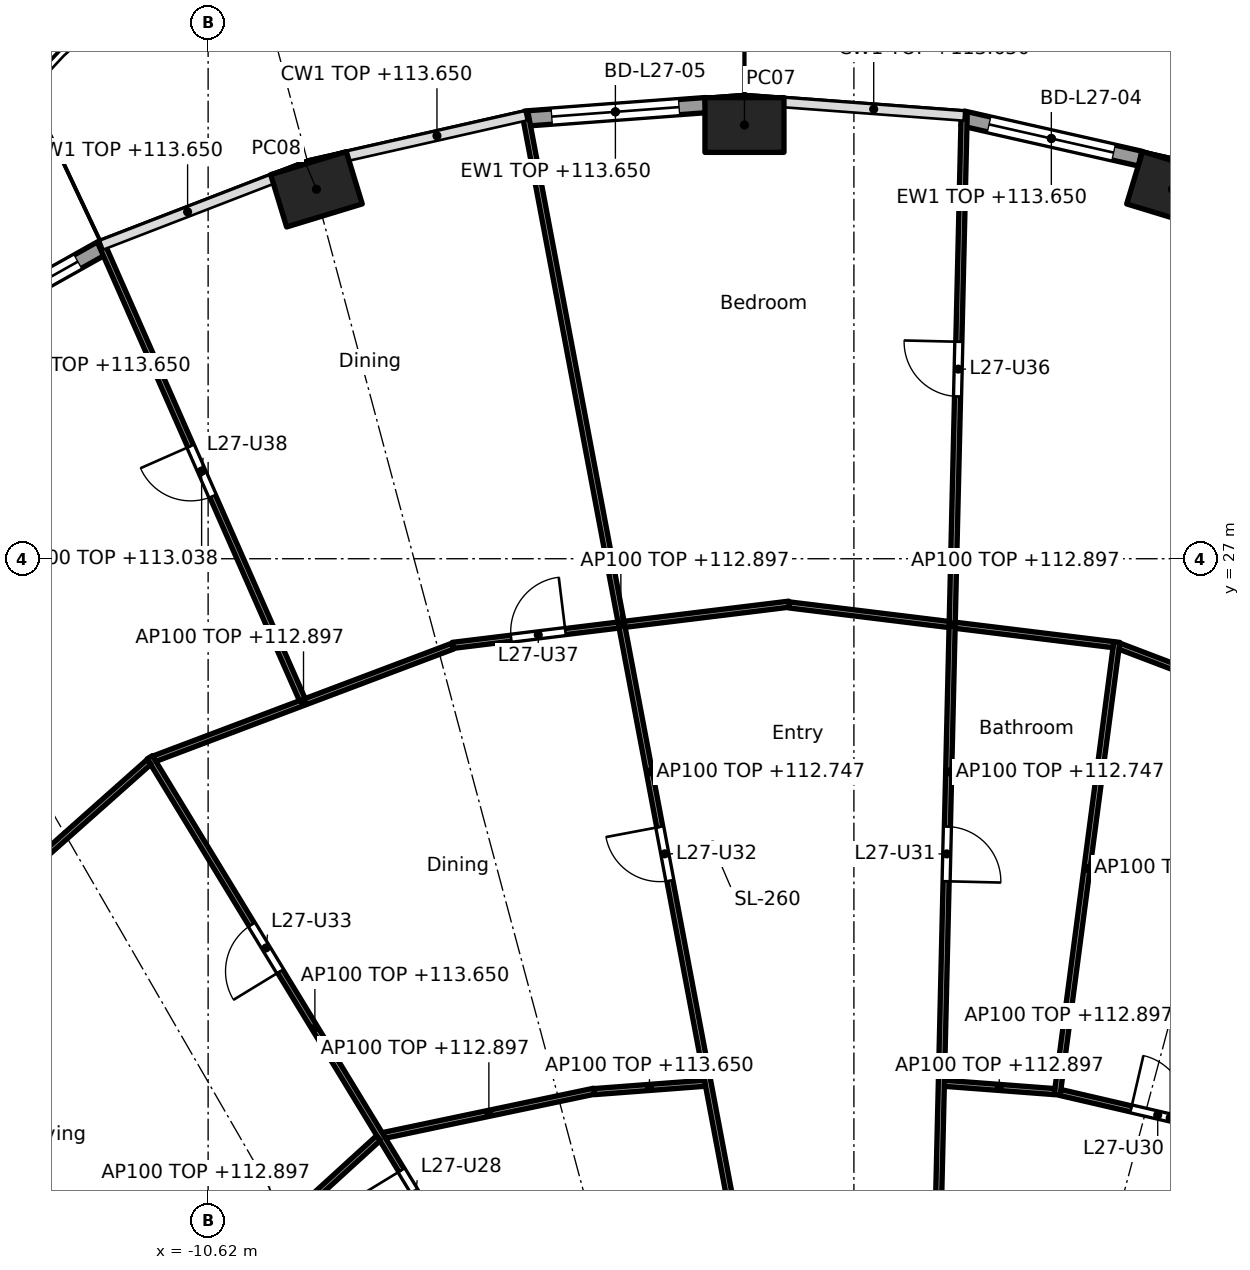
"""IFC4 building model, lengths in metres.
Left out: names, types, materials, properties, quantities, classifications, styles, units other than length and angle.
Written with IfcOpenShell. Run it as: python <this file> out.ifc"""

import sys

from ifc_helpers import new_model, si_unit, direction, frame, frame_2d, origin, origin_2d, place, context, subcontext, project, spatial, rectangle, hollow_rectangle, extrude, element, fill, save


model = new_model("IFC4")
c1 = context("Model", 3, precision=1e-05, world=origin(), true_north=direction((0.0, 1.0)))
c2 = subcontext(c1, "Body", "Model", "MODEL_VIEW")
j1 = project(units=[si_unit("LENGTHUNIT", "METRE"), si_unit("PLANEANGLEUNIT", "RADIAN")], contexts=[c1])
p1 = place(None, origin())
s1 = spatial("IfcSite", under=j1, at=p1, CompositionType="ELEMENT")
p2 = place(p1, origin())
s2 = spatial("IfcBuilding", under=s1, at=p2, CompositionType="ELEMENT")
p3 = place(p2, frame((0.0, 0.0, 110.3)))
s3 = spatial("IfcBuildingStorey", under=s2, at=p3, CompositionType="ELEMENT", Elevation=110.3)
for number, where, z_axis, x_axis in (
    (1, (5.239, 33.076, 0.0), (0.0, 0.0, 1.0), (-0.957, 0.292, 0.0)),
    (2, (-1.8, 34.133, 0.0), (0.0, 0.0, 1.0), (-1.0, 0.0, 0.0)),
    (3, (-8.839, 33.076, 0.0), (0.0, 0.0, 1.0), (-0.957, -0.292, 0.0)),
):
    element("IfcColumn", number, at=place(p3, frame(where, z_axis=z_axis, x_axis=x_axis)), inside=s3, PredefinedType="COLUMN", context=c2, shape_type="SweptSolid", body=[
        extrude(hollow_rectangle(XDim=1.3, YDim=0.9, WallThickness=0.045, at=origin_2d()), origin(), (0.0, 0.0, 1.0), 3.7),
    ])
p4 = place(p3, frame((1.787, 34.241, 0.0), z_axis=(0.0, 0.0, 1.0), x_axis=(0.975317607872, -0.220806620767, 0.0)))
e4 = element("IfcWall", 4, at=p4, inside=s3, PredefinedType="SOLIDWALL", context=c2, shape_type="SweptSolid", body=[
    extrude(rectangle(XDim=2.993, YDim=0.25, at=frame_2d((1.497, 0.0))), origin(), (0.0, 0.0, 1.0), 3.35),
])
p5 = place(p4, frame((0.447, 0.0, 0.0)))
e5 = element("IfcOpeningElement", 5, at=p5, cuts=e4, PredefinedType="OPENING", context=c2, shape_type="SweptSolid", body=[
    extrude(rectangle(XDim=2.1, YDim=2.4, at=frame_2d((1.05, 1.2))), frame((0.0, 0.135, 0.0), z_axis=(0.0, -1.0, 0.0), x_axis=(1.0, 0.0, 0.0)), (0.0, 0.0, 1.0), 0.27),
])
p6 = place(p3, frame((-5.406, 34.239, 0.0), z_axis=(0.0, 0.0, 1.0), x_axis=(0.997231808538, 0.074355363224, 0.0)))
e6 = element("IfcWall", 6, at=p6, inside=s3, PredefinedType="SOLIDWALL", context=c2, shape_type="SweptSolid", body=[
    extrude(rectangle(XDim=2.975, YDim=0.25, at=frame_2d((1.487, 0.0))), origin(), (0.0, 0.0, 1.0), 3.35),
])
p7 = place(p6, frame((0.438, 0.0, 0.0)))
e7 = element("IfcOpeningElement", 7, at=p7, cuts=e6, PredefinedType="OPENING", context=c2, shape_type="SweptSolid", body=[
    extrude(rectangle(XDim=2.1, YDim=2.4, at=frame_2d((1.05, 1.2))), frame((0.0, 0.135, 0.0), z_axis=(0.0, -1.0, 0.0), x_axis=(1.0, 0.0, 0.0)), (0.0, 0.0, 1.0), 0.27),
])
p8 = place(p3, frame((-15.02, 30.62, 0.0), z_axis=(0.0, 0.0, 1.0), x_axis=(0.872090167423, 0.489345215451, 0.0)))
e8 = element("IfcWall", 8, at=p8, inside=s3, PredefinedType="SOLIDWALL", context=c2, shape_type="SweptSolid", body=[
    extrude(rectangle(XDim=3.076, YDim=0.25, at=frame_2d((1.538, 0.0))), origin(), (0.0, 0.0, 1.0), 3.35),
])
p9 = place(p8, frame((0.488, 0.0, 0.0)))
e9 = element("IfcOpeningElement", 9, at=p9, cuts=e8, PredefinedType="OPENING", context=c2, shape_type="SweptSolid", body=[
    extrude(rectangle(XDim=2.1, YDim=2.4, at=frame_2d((1.05, 1.2))), frame((0.0, 0.135, 0.0), z_axis=(0.0, -1.0, 0.0), x_axis=(1.0, 0.0, 0.0)), (0.0, 0.0, 1.0), 0.27),
])
p10 = place(p3, frame((7.004, 17.386, 0.0), z_axis=(0.0, 0.0, 1.0), x_axis=(-0.974172890163, 0.22580341023, 0.0)))
e10 = element("IfcWall", 10, at=p10, inside=s3, PredefinedType="PARTITIONING", context=c2, shape_type="SweptSolid", body=[
    extrude(rectangle(XDim=3.702, YDim=0.1, at=frame_2d((1.851, 0.0))), origin(), (0.0, 0.0, 1.0), 2.597),
])
p11 = place(p10, frame((1.611, 0.0, 0.0)))
e11 = element("IfcOpeningElement", 11, at=p11, cuts=e10, PredefinedType="OPENING", context=c2, shape_type="SweptSolid", body=[
    extrude(rectangle(XDim=0.9, YDim=2.1, at=frame_2d((0.45, 1.05))), frame((0.0, 0.06, 0.0), z_axis=(0.0, -1.0, 0.0), x_axis=(1.0, 0.0, 0.0)), (0.0, 0.0, 1.0), 0.12),
])
p12 = place(p3, frame((9.379, 23.655, 0.0), z_axis=(0.0, 0.0, 1.0), x_axis=(-0.934613076136, 0.355666132653, 0.0)))
e12 = element("IfcWall", 12, at=p12, inside=s3, PredefinedType="PARTITIONING", context=c2, shape_type="SweptSolid", body=[
    extrude(rectangle(XDim=5.366, YDim=0.1, at=frame_2d((2.683, 0.0))), origin(), (0.0, 0.0, 1.0), 2.597),
])
p13 = place(p12, frame((2.233, 0.0, 0.0)))
e13 = element("IfcOpeningElement", 13, at=p13, cuts=e12, PredefinedType="OPENING", context=c2, shape_type="SweptSolid", body=[
    extrude(rectangle(XDim=0.9, YDim=2.1, at=frame_2d((0.45, 1.05))), frame((0.0, 0.06, 0.0), z_axis=(0.0, -1.0, 0.0), x_axis=(1.0, 0.0, 0.0)), (0.0, 0.0, 1.0), 0.12),
])
p14 = place(p3, frame((3.343, 18.184, 0.0), z_axis=(0.0, 0.0, 1.0), x_axis=(0.130596603503, 0.991435589009, 0.0)))
e14 = element("IfcWall", 14, at=p14, inside=s3, PredefinedType="PARTITIONING", context=c2, shape_type="SweptSolid", body=[
    extrude(rectangle(XDim=7.511, YDim=0.1, at=frame_2d((3.756, 0.0))), origin(), (0.0, 0.0, 1.0), 3.35),
])
p15 = place(p3, frame((3.299, 18.237, 0.0), z_axis=(0.0, 0.0, 1.0), x_axis=(-0.997152920483, 0.075405922664, 0.0)))
e15 = element("IfcWall", 15, at=p15, inside=s3, PredefinedType="PARTITIONING", context=c2, shape_type="SweptSolid", body=[
    extrude(rectangle(XDim=1.823, YDim=0.1, at=frame_2d((0.911, 0.0))), origin(), (0.0, 0.0, 1.0), 2.597),
])
p16 = place(p3, frame((4.267, 25.587, 0.0), z_axis=(0.0, 0.0, 1.0), x_axis=(-0.992576206119, 0.121624319302, 0.0)))
e16 = element("IfcWall", 16, at=p16, inside=s3, PredefinedType="PARTITIONING", context=c2, shape_type="SweptSolid", body=[
    extrude(rectangle(XDim=5.374, YDim=0.1, at=frame_2d((2.687, 0.0))), origin(), (0.0, 0.0, 1.0), 2.597),
])
p17 = place(p3, frame((1.303, 12.665, 0.0), z_axis=(0.0, 0.0, 1.0), x_axis=(0.023564110689, 0.999722327793, 0.0)))
e17 = element("IfcWall", 17, at=p17, inside=s3, PredefinedType="PARTITIONING", context=c2, shape_type="SweptSolid", body=[
    extrude(rectangle(XDim=21.664, YDim=0.1, at=frame_2d((10.832, 0.0))), origin(), (0.0, 0.0, 1.0), 2.447),
])
p18 = place(p17, frame((2.407, 0.0, 0.0)))
e18 = element("IfcOpeningElement", 18, at=p18, cuts=e17, PredefinedType="OPENING", context=c2, shape_type="SweptSolid", body=[
    extrude(rectangle(XDim=0.9, YDim=2.1, at=frame_2d((0.45, 1.05))), frame((0.0, 0.06, 0.0), z_axis=(0.0, -1.0, 0.0), x_axis=(1.0, 0.0, 0.0)), (0.0, 0.0, 1.0), 0.12),
])
p19 = place(p17, frame((9.034, 0.0, 0.0)))
e19 = element("IfcOpeningElement", 19, at=p19, cuts=e17, PredefinedType="OPENING", context=c2, shape_type="SweptSolid", body=[
    extrude(rectangle(XDim=0.9, YDim=2.1, at=frame_2d((0.45, 1.05))), frame((0.0, 0.06, 0.0), z_axis=(0.0, -1.0, 0.0), x_axis=(1.0, 0.0, 0.0)), (0.0, 0.0, 1.0), 0.12),
])
p20 = place(p17, frame((17.009, 0.0, 0.0)))
e20 = element("IfcOpeningElement", 20, at=p20, cuts=e17, PredefinedType="OPENING", context=c2, shape_type="SweptSolid", body=[
    extrude(rectangle(XDim=0.9, YDim=2.1, at=frame_2d((0.45, 1.05))), frame((0.0, 0.06, 0.0), z_axis=(0.0, -1.0, 0.0), x_axis=(1.0, 0.0, 0.0)), (0.0, 0.0, 1.0), 0.12),
])
p21 = place(p3, frame((-1.066, 26.253, 0.0), z_axis=(0.0, 0.0, 1.0), x_axis=(-0.992574197255, -0.121640712523, 0.0)))
e21 = element("IfcWall", 21, at=p21, inside=s3, PredefinedType="PARTITIONING", context=c2, shape_type="SweptSolid", body=[
    extrude(rectangle(XDim=5.574, YDim=0.1, at=frame_2d((2.787, 0.0))), origin(), (0.0, 0.0, 1.0), 2.597),
])
p22 = place(p21, frame((3.705, 0.0, 0.0)))
e22 = element("IfcOpeningElement", 22, at=p22, cuts=e21, PredefinedType="OPENING", context=c2, shape_type="SweptSolid", body=[
    extrude(rectangle(XDim=0.9, YDim=2.1, at=frame_2d((0.45, 1.05))), frame((0.0, 0.06, 0.0), z_axis=(0.0, -1.0, 0.0), x_axis=(1.0, 0.0, 0.0)), (0.0, 0.0, 1.0), 0.12),
])
p23 = place(p3, frame((-1.32, 12.663, 0.0), z_axis=(0.0, 0.0, 1.0), x_axis=(-0.185450638662, 0.982653581187, 0.0)))
e23 = element("IfcWall", 23, at=p23, inside=s3, PredefinedType="PARTITIONING", context=c2, shape_type="SweptSolid", body=[
    extrude(rectangle(XDim=22.043, YDim=0.1, at=frame_2d((11.021, 0.0))), origin(), (0.0, 0.0, 1.0), 2.447),
])
p24 = place(p23, frame((2.458, 0.0, 0.0)))
e24 = element("IfcOpeningElement", 24, at=p24, cuts=e23, PredefinedType="OPENING", context=c2, shape_type="SweptSolid", body=[
    extrude(rectangle(XDim=0.9, YDim=2.1, at=frame_2d((0.45, 1.05))), frame((0.0, 0.06, 0.0), z_axis=(0.0, -1.0, 0.0), x_axis=(1.0, 0.0, 0.0)), (0.0, 0.0, 1.0), 0.12),
])
p25 = place(p23, frame((9.202, 0.0, 0.0)))
e25 = element("IfcOpeningElement", 25, at=p25, cuts=e23, PredefinedType="OPENING", context=c2, shape_type="SweptSolid", body=[
    extrude(rectangle(XDim=0.9, YDim=2.1, at=frame_2d((0.45, 1.05))), frame((0.0, 0.06, 0.0), z_axis=(0.0, -1.0, 0.0), x_axis=(1.0, 0.0, 0.0)), (0.0, 0.0, 1.0), 0.12),
])
p26 = place(p3, frame((-2.453, 18.374, 0.0), z_axis=(0.0, 0.0, 1.0), x_axis=(-0.997153681897, -0.075395853197, 0.0)))
e26 = element("IfcWall", 26, at=p26, inside=s3, PredefinedType="PARTITIONING", context=c2, shape_type="SweptSolid", body=[
    extrude(rectangle(XDim=1.823, YDim=0.1, at=frame_2d((0.912, 0.0))), origin(), (0.0, 0.0, 1.0), 3.35),
])
p27 = place(p3, frame((-4.272, 18.243, 0.0), z_axis=(0.0, 0.0, 1.0), x_axis=(-0.978622947907, -0.205662650547, 0.0)))
e27 = element("IfcWall", 27, at=p27, inside=s3, PredefinedType="PARTITIONING", context=c2, shape_type="SweptSolid", body=[
    extrude(rectangle(XDim=3.538, YDim=0.1, at=frame_2d((1.769, 0.0))), origin(), (0.0, 0.0, 1.0), 2.597),
])
p28 = place(p3, frame((-6.596, 25.563, 0.0), z_axis=(0.0, 0.0, 1.0), x_axis=(-0.9356162121, -0.353018843201, 0.0)))
e28 = element("IfcWall", 28, at=p28, inside=s3, PredefinedType="PARTITIONING", context=c2, shape_type="SweptSolid", body=[
    extrude(rectangle(XDim=5.249, YDim=0.1, at=frame_2d((2.625, 0.0))), origin(), (0.0, 0.0, 1.0), 2.597),
])
p29 = place(p3, frame((-9.072, 24.683, 0.0), z_axis=(0.0, 0.0, 1.0), x_axis=(-0.403192911159, 0.915115007194, 0.0)))
e29 = element("IfcWall", 29, at=p29, inside=s3, PredefinedType="PARTITIONING", context=c2, shape_type="SweptSolid", body=[
    extrude(rectangle(XDim=8.211, YDim=0.1, at=frame_2d((4.106, 0.0))), origin(), (0.0, 0.0, 1.0), 2.738),
])
p30 = place(p29, frame((3.656, 0.0, 0.0)))
e30 = element("IfcOpeningElement", 30, at=p30, cuts=e29, PredefinedType="OPENING", context=c2, shape_type="SweptSolid", body=[
    extrude(rectangle(XDim=0.9, YDim=2.1, at=frame_2d((0.45, 1.05))), frame((0.0, 0.06, 0.0), z_axis=(0.0, -1.0, 0.0), x_axis=(1.0, 0.0, 0.0)), (0.0, 0.0, 1.0), 0.12),
])
p31 = place(p3, frame((-6.149, 14.825, 0.0), z_axis=(0.0, 0.0, 1.0), x_axis=(-0.520411490252, 0.853915616917, 0.0)))
e31 = element("IfcWall", 31, at=p31, inside=s3, PredefinedType="PARTITIONING", context=c2, shape_type="SweptSolid", body=[
    extrude(rectangle(XDim=10.435, YDim=0.1, at=frame_2d((5.218, 0.0))), origin(), (0.0, 0.0, 1.0), 3.35),
])
p32 = place(p31, frame((1.582, 0.0, 0.0)))
e32 = element("IfcOpeningElement", 32, at=p32, cuts=e31, PredefinedType="OPENING", context=c2, shape_type="SweptSolid", body=[
    extrude(rectangle(XDim=0.9, YDim=2.1, at=frame_2d((0.45, 1.05))), frame((0.0, 0.06, 0.0), z_axis=(0.0, -1.0, 0.0), x_axis=(1.0, 0.0, 0.0)), (0.0, 0.0, 1.0), 0.12),
])
p33 = place(p31, frame((6.312, 0.0, 0.0)))
e33 = element("IfcOpeningElement", 33, at=p33, cuts=e31, PredefinedType="OPENING", context=c2, shape_type="SweptSolid", body=[
    extrude(rectangle(XDim=0.9, YDim=2.1, at=frame_2d((0.45, 1.05))), frame((0.0, 0.06, 0.0), z_axis=(0.0, -1.0, 0.0), x_axis=(1.0, 0.0, 0.0)), (0.0, 0.0, 1.0), 0.12),
])
p34 = place(p3, frame((-7.82, 17.472, 0.0), z_axis=(0.0, 0.0, 1.0), x_axis=(-0.73885182489, -0.67386792538, 0.0)))
e34 = element("IfcWall", 34, at=p34, inside=s3, PredefinedType="PARTITIONING", context=c2, shape_type="SweptSolid", body=[
    extrude(rectangle(XDim=4.846, YDim=0.1, at=frame_2d((2.423, 0.0))), origin(), (0.0, 0.0, 1.0), 2.597),
])
p35 = place(p3, frame((-11.591, 23.66, 0.0), z_axis=(0.0, 0.0, 1.0), x_axis=(-0.747429278403, -0.664341383466, 0.0)))
e35 = element("IfcWall", 35, at=p35, inside=s3, PredefinedType="PARTITIONING", context=c2, shape_type="SweptSolid", body=[
    extrude(rectangle(XDim=6.073, YDim=0.1, at=frame_2d((3.037, 0.0))), origin(), (0.0, 0.0, 1.0), 2.597),
])
p36 = place(p3, frame((-8.959, 8.952, 0.0), z_axis=(0.0, 0.0, 1.0), x_axis=(-0.742679904999, 0.669646592398, 0.0)))
e36 = element("IfcWall", 36, at=p36, inside=s3, PredefinedType="PARTITIONING", context=c2, shape_type="SweptSolid", body=[
    extrude(rectangle(XDim=12.121, YDim=0.1, at=frame_2d((6.061, 0.0))), origin(), (0.0, 0.0, 1.0), 2.447),
])
p37 = place(p36, frame((2.172, 0.0, 0.0)))
e37 = element("IfcOpeningElement", 37, at=p37, cuts=e36, PredefinedType="OPENING", context=c2, shape_type="SweptSolid", body=[
    extrude(rectangle(XDim=0.9, YDim=2.1, at=frame_2d((0.45, 1.05))), frame((0.0, 0.06, 0.0), z_axis=(0.0, -1.0, 0.0), x_axis=(1.0, 0.0, 0.0)), (0.0, 0.0, 1.0), 0.12),
])
p38 = place(p36, frame((8.233, 0.0, 0.0)))
e38 = element("IfcOpeningElement", 38, at=p38, cuts=e36, PredefinedType="OPENING", context=c2, shape_type="SweptSolid", body=[
    extrude(rectangle(XDim=0.9, YDim=2.1, at=frame_2d((0.45, 1.05))), frame((0.0, 0.06, 0.0), z_axis=(0.0, -1.0, 0.0), x_axis=(1.0, 0.0, 0.0)), (0.0, 0.0, 1.0), 0.12),
])
p39 = place(p5, origin())
e39 = element("IfcDoor", 39, at=p39, inside=s3, OperationType="SLIDING_TO_LEFT", PredefinedType="DOOR", context=c2, shape_type="SweptSolid", body=[
    extrude(rectangle(XDim=2.1, YDim=2.4, at=frame_2d((1.05, 1.2))), frame((0.0, 0.025, 0.0), z_axis=(0.0, -1.0, 0.0), x_axis=(1.0, 0.0, 0.0)), (0.0, 0.0, 1.0), 0.05),
])
fill(e5, e39)
p40 = place(p7, origin())
e40 = element("IfcDoor", 40, at=p40, inside=s3, OperationType="SLIDING_TO_LEFT", PredefinedType="DOOR", context=c2, shape_type="SweptSolid", body=[
    extrude(rectangle(XDim=2.1, YDim=2.4, at=frame_2d((1.05, 1.2))), frame((0.0, 0.025, 0.0), z_axis=(0.0, -1.0, 0.0), x_axis=(1.0, 0.0, 0.0)), (0.0, 0.0, 1.0), 0.05),
])
fill(e7, e40)
p41 = place(p9, origin())
e41 = element("IfcDoor", 41, at=p41, inside=s3, OperationType="SLIDING_TO_LEFT", PredefinedType="DOOR", context=c2, shape_type="SweptSolid", body=[
    extrude(rectangle(XDim=2.1, YDim=2.4, at=frame_2d((1.05, 1.2))), frame((0.0, 0.025, 0.0), z_axis=(0.0, -1.0, 0.0), x_axis=(1.0, 0.0, 0.0)), (0.0, 0.0, 1.0), 0.05),
])
fill(e9, e41)
p42 = place(p32, origin())
e42 = element("IfcDoor", 42, at=p42, inside=s3, OperationType="SINGLE_SWING_RIGHT", PredefinedType="DOOR", context=c2, shape_type="SweptSolid", body=[
    extrude(rectangle(XDim=0.9, YDim=2.1, at=frame_2d((0.45, 1.05))), frame((0.0, 0.025, 0.0), z_axis=(0.0, -1.0, 0.0), x_axis=(1.0, 0.0, 0.0)), (0.0, 0.0, 1.0), 0.05),
])
fill(e32, e42)
p43 = place(p11, frame((0.9, 0.0, 0.0), x_axis=(-1.0, 0.0, 0.0)))
e43 = element("IfcDoor", 43, at=p43, inside=s3, OperationType="SINGLE_SWING_LEFT", PredefinedType="DOOR", context=c2, shape_type="SweptSolid", body=[
    extrude(rectangle(XDim=0.9, YDim=2.1, at=frame_2d((0.45, 1.05))), frame((0.0, 0.025, 0.0), z_axis=(0.0, -1.0, 0.0), x_axis=(1.0, 0.0, 0.0)), (0.0, 0.0, 1.0), 0.05),
])
fill(e11, e43)
p44 = place(p19, frame((0.9, 0.0, 0.0), x_axis=(-1.0, 0.0, 0.0)))
e44 = element("IfcDoor", 44, at=p44, inside=s3, OperationType="SINGLE_SWING_RIGHT", PredefinedType="DOOR", context=c2, shape_type="SweptSolid", body=[
    extrude(rectangle(XDim=0.9, YDim=2.1, at=frame_2d((0.45, 1.05))), frame((0.0, 0.025, 0.0), z_axis=(0.0, -1.0, 0.0), x_axis=(1.0, 0.0, 0.0)), (0.0, 0.0, 1.0), 0.05),
])
fill(e19, e44)
p45 = place(p25, origin())
e45 = element("IfcDoor", 45, at=p45, inside=s3, OperationType="SINGLE_SWING_RIGHT", PredefinedType="DOOR", context=c2, shape_type="SweptSolid", body=[
    extrude(rectangle(XDim=0.9, YDim=2.1, at=frame_2d((0.45, 1.05))), frame((0.0, 0.025, 0.0), z_axis=(0.0, -1.0, 0.0), x_axis=(1.0, 0.0, 0.0)), (0.0, 0.0, 1.0), 0.05),
])
fill(e25, e45)
p46 = place(p33, origin())
e46 = element("IfcDoor", 46, at=p46, inside=s3, OperationType="SINGLE_SWING_LEFT", PredefinedType="DOOR", context=c2, shape_type="SweptSolid", body=[
    extrude(rectangle(XDim=0.9, YDim=2.1, at=frame_2d((0.45, 1.05))), frame((0.0, 0.025, 0.0), z_axis=(0.0, -1.0, 0.0), x_axis=(1.0, 0.0, 0.0)), (0.0, 0.0, 1.0), 0.05),
])
fill(e33, e46)
p47 = place(p20, origin())
e47 = element("IfcDoor", 47, at=p47, inside=s3, OperationType="SINGLE_SWING_RIGHT", PredefinedType="DOOR", context=c2, shape_type="SweptSolid", body=[
    extrude(rectangle(XDim=0.9, YDim=2.1, at=frame_2d((0.45, 1.05))), frame((0.0, 0.025, 0.0), z_axis=(0.0, -1.0, 0.0), x_axis=(1.0, 0.0, 0.0)), (0.0, 0.0, 1.0), 0.05),
])
fill(e20, e47)
p48 = place(p22, frame((0.9, 0.0, 0.0), x_axis=(-1.0, 0.0, 0.0)))
e48 = element("IfcDoor", 48, at=p48, inside=s3, OperationType="SINGLE_SWING_RIGHT", PredefinedType="DOOR", context=c2, shape_type="SweptSolid", body=[
    extrude(rectangle(XDim=0.9, YDim=2.1, at=frame_2d((0.45, 1.05))), frame((0.0, 0.025, 0.0), z_axis=(0.0, -1.0, 0.0), x_axis=(1.0, 0.0, 0.0)), (0.0, 0.0, 1.0), 0.05),
])
fill(e22, e48)
p49 = place(p30, origin())
e49 = element("IfcDoor", 49, at=p49, inside=s3, OperationType="SINGLE_SWING_RIGHT", PredefinedType="DOOR", context=c2, shape_type="SweptSolid", body=[
    extrude(rectangle(XDim=0.9, YDim=2.1, at=frame_2d((0.45, 1.05))), frame((0.0, 0.025, 0.0), z_axis=(0.0, -1.0, 0.0), x_axis=(1.0, 0.0, 0.0)), (0.0, 0.0, 1.0), 0.05),
])
fill(e30, e49)
save(model, sys.argv[1])
